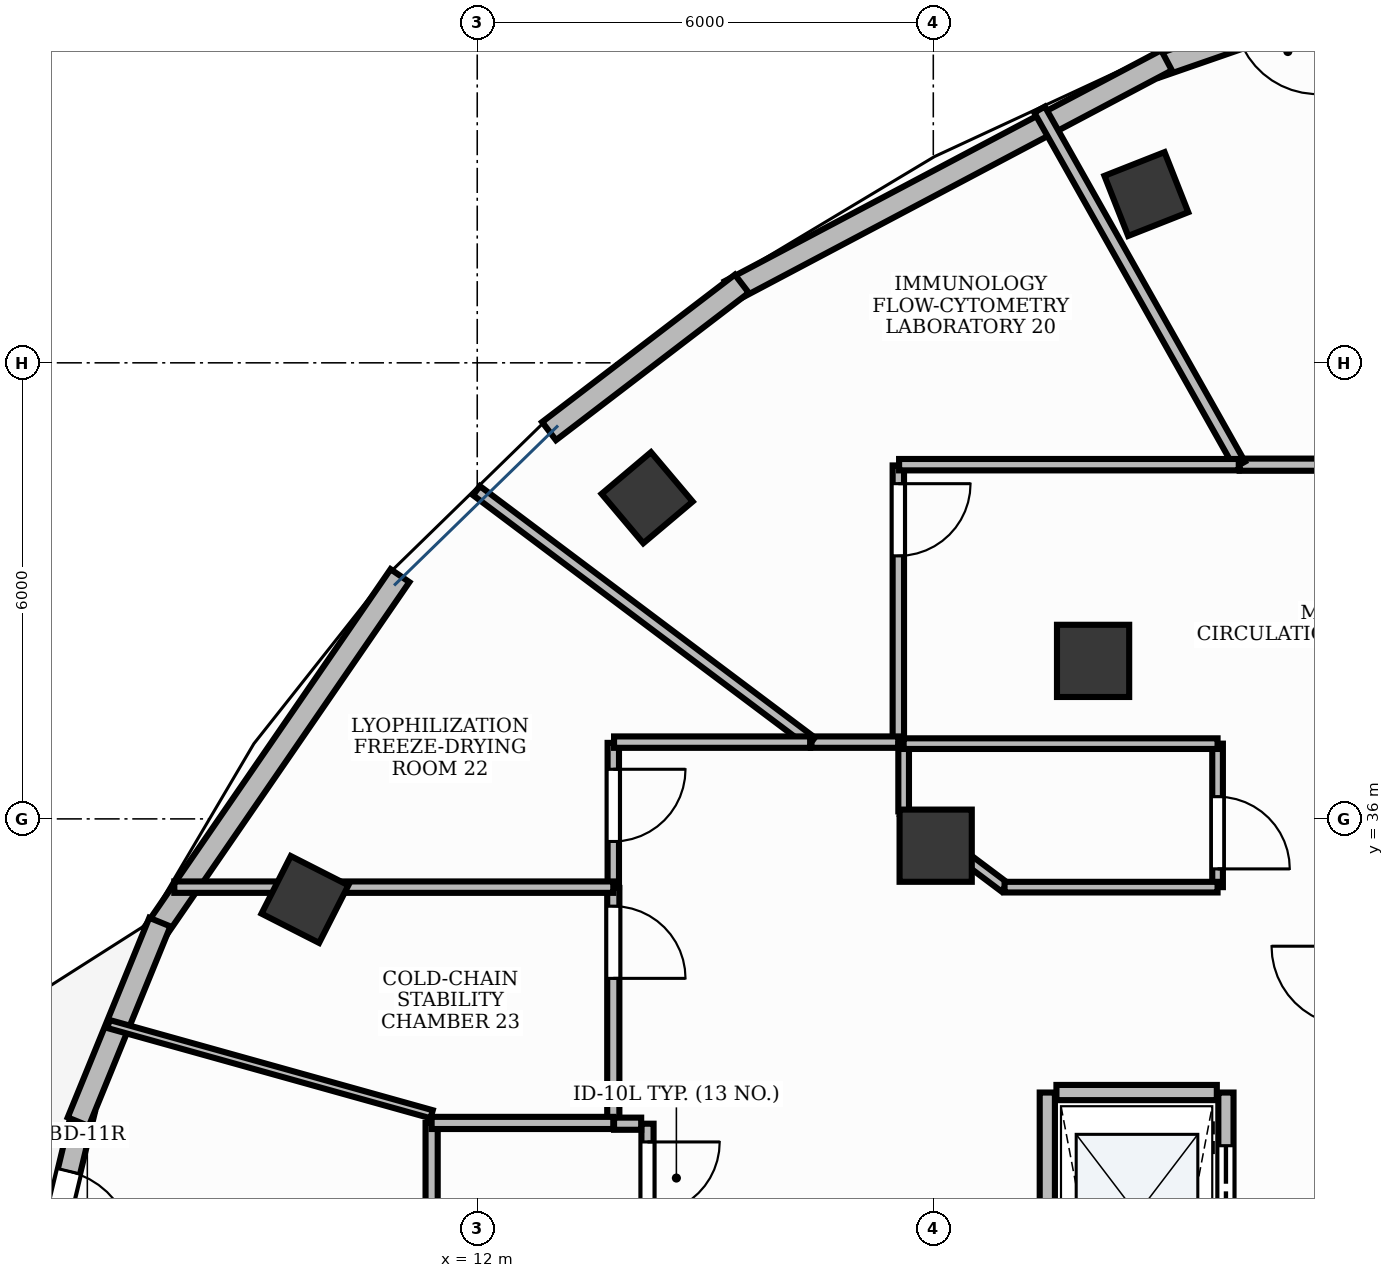
"""IFC4 building model, lengths in metres.
Left out: names, types, materials, properties, quantities, classifications, styles, units other than length and angle.
Written with IfcOpenShell. Run it as: python <this file> out.ifc"""

import sys

from ifc_helpers import new_model, si_unit, direction, frame, frame_2d, origin, origin_2d, place, context, subcontext, project, spatial, rectangle, extrude, element, fill, save


model = new_model("IFC4")
c1 = context("Model", 3, precision=1e-05, world=origin(), true_north=direction((0.0, 1.0)))
c2 = subcontext(c1, "Body", "Model", "MODEL_VIEW")
j1 = project(units=[si_unit("LENGTHUNIT", "METRE"), si_unit("PLANEANGLEUNIT", "RADIAN")], contexts=[c1])
p1 = place(None, origin())
s1 = spatial("IfcSite", under=j1, at=p1, CompositionType="ELEMENT")
p2 = place(p1, origin())
s2 = spatial("IfcBuilding", under=s1, at=p2, CompositionType="ELEMENT")
p3 = place(p2, frame((0.0, 0.0, 256.2)))
s3 = spatial("IfcBuildingStorey", under=s2, at=p3, CompositionType="ELEMENT", Elevation=256.2)
for number, where, z_axis, x_axis in (
    (1, (20.803, 44.22, -0.0), (0.0, 0.0, 1.0), (0.93, 0.367, 0.0)),
    (2, (14.235, 40.225, -0.0), (0.0, 0.0, 1.0), (0.764, 0.645, 0.0)),
):
    element("IfcColumn", number, at=place(p3, frame(where, z_axis=z_axis, x_axis=x_axis)), inside=s3, PredefinedType="COLUMN", context=c2, shape_type="SweptSolid", body=[
        extrude(rectangle(XDim=0.85, YDim=0.85, at=origin_2d()), origin(), (0.0, 0.0, 1.0), 3.901),
    ])
p4 = place(p3, frame((20.102, 38.079, -0.0), z_axis=(0.0, 0.0, 1.0), x_axis=(1.0, 0.0, 0.0)))
e3 = element("IfcColumn", 3, at=p4, inside=s3, PredefinedType="COLUMN", context=c2, shape_type="SweptSolid", body=[
    extrude(rectangle(XDim=0.95, YDim=0.95, at=origin_2d()), origin(), (0.0, 0.0, 1.0), 3.901),
])
p5 = place(p3, frame((9.733, 34.94, -0.0), z_axis=(0.0, 0.0, 1.0), x_axis=(0.453057191132, 0.891481453292, 0.0)))
e4 = element("IfcColumn", 4, at=p5, inside=s3, PredefinedType="COLUMN", context=c2, shape_type="SweptSolid", body=[
    extrude(rectangle(XDim=0.85, YDim=0.85, at=origin_2d()), origin(), (0.0, 0.0, 1.0), 3.901),
])
p6 = place(p3, frame((18.031, 35.647, -0.0), z_axis=(0.0, 0.0, 1.0), x_axis=(1.0, 0.0, 0.0)))
e5 = element("IfcColumn", 5, at=p6, inside=s3, PredefinedType="COLUMN", context=c2, shape_type="SweptSolid", body=[
    extrude(rectangle(XDim=0.95, YDim=0.95, at=origin_2d()), origin(), (0.0, 0.0, 1.0), 3.901),
])
p7 = place(p3, frame((24.152, 47.013, 0.0), z_axis=(0.0, 0.0, 1.0), x_axis=(-0.944837969822, -0.327538105849, 0.0)))
e6 = element("IfcWall", 6, at=p7, inside=s3, PredefinedType="STANDARD", context=c2, shape_type="SweptSolid", body=[
    extrude(rectangle(XDim=3.412, YDim=0.3, at=frame_2d((1.706, 0.0))), origin(), (0.0, 0.0, 1.0), 3.9),
])
p8 = place(p7, frame((1.156, 0.0, 0.0)))
e7 = element("IfcOpeningElement", 7, at=p8, cuts=e6, PredefinedType="OPENING", context=c2, shape_type="SweptSolid", body=[
    extrude(rectangle(XDim=1.1, YDim=2.15, at=frame_2d((0.55, 1.075))), frame((0.0, 0.165, 0.0), z_axis=(0.0, -1.0, 0.0), x_axis=(1.0, 0.0, 0.0)), (0.0, 0.0, 1.0), 0.33),
])
p9 = place(p3, frame((6.822, 32.164, 0.0), z_axis=(0.0, 0.0, 1.0), x_axis=(-0.233611743884, -0.972329961031, 0.0)))
e8 = element("IfcWall", 8, at=p9, inside=s3, PredefinedType="STANDARD", context=c2, shape_type="SweptSolid", body=[
    extrude(rectangle(XDim=2.745, YDim=0.3, at=frame_2d((1.373, 0.0))), origin(), (0.0, 0.0, 1.0), 3.9),
])
p10 = place(p9, frame((0.823, 0.0, 0.0)))
e9 = element("IfcOpeningElement", 9, at=p10, cuts=e8, PredefinedType="OPENING", context=c2, shape_type="SweptSolid", body=[
    extrude(rectangle(XDim=1.1, YDim=2.15, at=frame_2d((0.55, 1.075))), frame((0.0, 0.165, 0.0), z_axis=(0.0, -1.0, 0.0), x_axis=(1.0, 0.0, 0.0)), (0.0, 0.0, 1.0), 0.33),
])
p11 = place(p3, frame((21.069, 45.98, 0.0), z_axis=(0.0, 0.0, 1.0), x_axis=(-0.883907649271, -0.467661488216, 0.0)))
e10 = element("IfcWall", 10, at=p11, inside=s3, PredefinedType="STANDARD", context=c2, shape_type="SweptSolid", body=[
    extrude(rectangle(XDim=6.496, YDim=0.3, at=frame_2d((3.248, 0.0))), origin(), (0.0, 0.0, 1.0), 3.9),
])
p12 = place(p3, frame((15.481, 43.041, 0.0), z_axis=(0.0, 0.0, 1.0), x_axis=(-0.794422949099, -0.60736494626, 0.0)))
e11 = element("IfcWall", 11, at=p12, inside=s3, PredefinedType="STANDARD", context=c2, shape_type="SweptSolid", body=[
    extrude(rectangle(XDim=3.192, YDim=0.3, at=frame_2d((1.596, 0.0))), origin(), (0.0, 0.0, 1.0), 3.9),
])
p13 = place(p3, frame((10.984, 39.2, 0.0), z_axis=(0.0, 0.0, 1.0), x_axis=(-0.566669772846, -0.823945003349, 0.0)))
e12 = element("IfcWall", 12, at=p13, inside=s3, PredefinedType="STANDARD", context=c2, shape_type="SweptSolid", body=[
    extrude(rectangle(XDim=5.734, YDim=0.3, at=frame_2d((2.867, 0.0))), origin(), (0.0, 0.0, 1.0), 3.9),
])
p14 = place(p3, frame((7.824, 34.642, 0.0), z_axis=(0.0, 0.0, 1.0), x_axis=(-0.378264258805, -0.925697656101, 0.0)))
e13 = element("IfcWall", 13, at=p14, inside=s3, PredefinedType="STANDARD", context=c2, shape_type="SweptSolid", body=[
    extrude(rectangle(XDim=2.837, YDim=0.3, at=frame_2d((1.419, 0.0))), origin(), (0.0, 0.0, 1.0), 3.9),
])
p15 = place(p3, frame((19.5, 21.6, 0.0), z_axis=(0.0, 0.0, 1.0), x_axis=(0.0, 1.0, 0.0)))
e14 = element("IfcWall", 14, at=p15, inside=s3, PredefinedType="PARTITIONING", context=c2, shape_type="SweptSolid", body=[
    extrude(rectangle(XDim=10.8, YDim=0.2, at=frame_2d((5.4, 0.0))), origin(), (0.0, 0.0, 1.0), 2.22),
])
p16 = place(p3, frame((21.85, 21.6, 0.0), z_axis=(0.0, 0.0, 1.0), x_axis=(0.0, 1.0, 0.0)))
e15 = element("IfcWall", 15, at=p16, inside=s3, PredefinedType="PARTITIONING", context=c2, shape_type="SweptSolid", body=[
    extrude(rectangle(XDim=10.8, YDim=0.2, at=frame_2d((5.4, 0.0))), origin(), (0.0, 0.0, 1.0), 2.22),
])
p17 = place(p16, frame((0.9, 0.0, 0.0)))
e16 = element("IfcOpeningElement", 16, at=p17, cuts=e15, PredefinedType="OPENING", context=c2, shape_type="SweptSolid", body=[
    extrude(rectangle(XDim=1.1, YDim=2.2, at=frame_2d((0.55, 1.1))), frame((0.0, 0.115, 0.0), z_axis=(0.0, -1.0, 0.0), x_axis=(1.0, 0.0, 0.0)), (0.0, 0.0, 1.0), 0.23),
])
p18 = place(p16, frame((3.6, 0.0, 0.0)))
e17 = element("IfcOpeningElement", 17, at=p18, cuts=e15, PredefinedType="OPENING", context=c2, shape_type="SweptSolid", body=[
    extrude(rectangle(XDim=1.1, YDim=2.2, at=frame_2d((0.55, 1.1))), frame((0.0, 0.115, 0.0), z_axis=(0.0, -1.0, 0.0), x_axis=(1.0, 0.0, 0.0)), (0.0, 0.0, 1.0), 0.23),
])
p19 = place(p16, frame((6.3, 0.0, 0.0)))
e18 = element("IfcOpeningElement", 18, at=p19, cuts=e15, PredefinedType="OPENING", context=c2, shape_type="SweptSolid", body=[
    extrude(rectangle(XDim=1.1, YDim=2.2, at=frame_2d((0.55, 1.1))), frame((0.0, 0.115, 0.0), z_axis=(0.0, -1.0, 0.0), x_axis=(1.0, 0.0, 0.0)), (0.0, 0.0, 1.0), 0.23),
])
p20 = place(p16, frame((9.0, 0.0, 0.0)))
e19 = element("IfcOpeningElement", 19, at=p20, cuts=e15, PredefinedType="OPENING", context=c2, shape_type="SweptSolid", body=[
    extrude(rectangle(XDim=1.1, YDim=2.2, at=frame_2d((0.55, 1.1))), frame((0.0, 0.115, 0.0), z_axis=(0.0, -1.0, 0.0), x_axis=(1.0, 0.0, 0.0)), (0.0, 0.0, 1.0), 0.23),
])
p21 = place(p3, frame((19.62, 32.4, 0.0), z_axis=(0.0, 0.0, 1.0), x_axis=(1.0, 0.0, 0.0)))
e20 = element("IfcWall", 20, at=p21, inside=s3, PredefinedType="PARTITIONING", context=c2, shape_type="SweptSolid", body=[
    extrude(rectangle(XDim=2.11, YDim=0.2, at=frame_2d((1.055, 0.0))), origin(), (0.0, 0.0, 1.0), 2.22),
])
p22 = place(p3, frame((14.24, 31.99, 0.0), z_axis=(0.0, 0.0, 1.0), x_axis=(0.0, -1.0, 0.0)))
e21 = element("IfcWall", 21, at=p22, inside=s3, PredefinedType="PARTITIONING", context=c2, shape_type="SweptSolid", body=[
    extrude(rectangle(XDim=3.58, YDim=0.16, at=frame_2d((1.79, 0.0))), origin(), (0.0, 0.0, 1.0), 2.22),
])
p23 = place(p22, frame((0.24, 0.0, 0.0)))
e22 = element("IfcOpeningElement", 22, at=p23, cuts=e21, PredefinedType="OPENING", context=c2, shape_type="SweptSolid", body=[
    extrude(rectangle(XDim=0.95, YDim=2.15, at=frame_2d((0.475, 1.075))), frame((0.0, 0.095, 0.0), z_axis=(0.0, -1.0, 0.0), x_axis=(1.0, 0.0, 0.0)), (0.0, 0.0, 1.0), 0.19),
])
p24 = place(p3, frame((28.354, 40.66, 0.0), z_axis=(0.0, 0.0, 1.0), x_axis=(-1.0, 0.0, 0.0)))
e23 = element("IfcWall", 23, at=p24, inside=s3, PredefinedType="PARTITIONING", context=c2, shape_type="SweptSolid", body=[
    extrude(rectangle(XDim=6.323, YDim=0.16, at=frame_2d((3.162, 0.0))), origin(), (0.0, 0.0, 1.0), 2.22),
])
p25 = place(p24, frame((0.24, 0.0, 0.0)))
e24 = element("IfcOpeningElement", 24, at=p25, cuts=e23, PredefinedType="OPENING", context=c2, shape_type="SweptSolid", body=[
    extrude(rectangle(XDim=0.95, YDim=2.15, at=frame_2d((0.475, 1.075))), frame((0.0, 0.095, 0.0), z_axis=(0.0, -1.0, 0.0), x_axis=(1.0, 0.0, 0.0)), (0.0, 0.0, 1.0), 0.19),
])
p26 = place(p3, frame((17.54, 40.65, 0.0), z_axis=(0.0, 0.0, 1.0), x_axis=(0.0, -1.0, 0.0)))
e25 = element("IfcWall", 25, at=p26, inside=s3, PredefinedType="PARTITIONING", context=c2, shape_type="SweptSolid", body=[
    extrude(rectangle(XDim=3.64, YDim=0.15, at=frame_2d((1.82, 0.0))), origin(), (0.0, 0.0, 1.0), 2.22),
])
p27 = place(p26, frame((0.24, 0.0, 0.0)))
e26 = element("IfcOpeningElement", 26, at=p27, cuts=e25, PredefinedType="OPENING", context=c2, shape_type="SweptSolid", body=[
    extrude(rectangle(XDim=0.95, YDim=2.15, at=frame_2d((0.475, 1.075))), frame((0.0, 0.09, 0.0), z_axis=(0.0, -1.0, 0.0), x_axis=(1.0, 0.0, 0.0)), (0.0, 0.0, 1.0), 0.18),
])
p28 = place(p3, frame((21.74, 36.99, 0.0), z_axis=(0.0, 0.0, 1.0), x_axis=(0.0, -1.0, 0.0)))
e27 = element("IfcWall", 27, at=p28, inside=s3, PredefinedType="PARTITIONING", context=c2, shape_type="SweptSolid", body=[
    extrude(rectangle(XDim=1.888, YDim=0.14, at=frame_2d((0.944, 0.0))), origin(), (0.0, 0.0, 1.0), 2.22),
])
p29 = place(p28, frame((0.698, 0.0, 0.0)))
e28 = element("IfcOpeningElement", 28, at=p29, cuts=e27, PredefinedType="OPENING", context=c2, shape_type="SweptSolid", body=[
    extrude(rectangle(XDim=0.95, YDim=2.15, at=frame_2d((0.475, 1.075))), frame((0.0, 0.085, 0.0), z_axis=(0.0, -1.0, 0.0), x_axis=(1.0, 0.0, 0.0)), (0.0, 0.0, 1.0), 0.17),
])
p30 = place(p3, frame((13.79, 37.0, 0.0), z_axis=(0.0, 0.0, 1.0), x_axis=(0.0, -1.0, 0.0)))
e29 = element("IfcWall", 29, at=p30, inside=s3, PredefinedType="PARTITIONING", context=c2, shape_type="SweptSolid", body=[
    extrude(rectangle(XDim=1.898, YDim=0.15, at=frame_2d((0.949, 0.0))), origin(), (0.0, 0.0, 1.0), 2.22),
])
p31 = place(p30, frame((0.347, 0.0, 0.0)))
e30 = element("IfcOpeningElement", 30, at=p31, cuts=e29, PredefinedType="OPENING", context=c2, shape_type="SweptSolid", body=[
    extrude(rectangle(XDim=0.95, YDim=2.15, at=frame_2d((0.475, 1.075))), frame((0.0, 0.09, 0.0), z_axis=(0.0, -1.0, 0.0), x_axis=(1.0, 0.0, 0.0)), (0.0, 0.0, 1.0), 0.18),
])
p32 = place(p3, frame((13.79, 35.092, 0.0), z_axis=(0.0, 0.0, 1.0), x_axis=(0.0, -1.0, 0.0)))
e31 = element("IfcWall", 31, at=p32, inside=s3, PredefinedType="PARTITIONING", context=c2, shape_type="SweptSolid", body=[
    extrude(rectangle(XDim=3.082, YDim=0.16, at=frame_2d((1.541, 0.0))), origin(), (0.0, 0.0, 1.0), 2.22),
])
p33 = place(p32, frame((0.24, 0.0, 0.0)))
e32 = element("IfcOpeningElement", 32, at=p33, cuts=e31, PredefinedType="OPENING", context=c2, shape_type="SweptSolid", body=[
    extrude(rectangle(XDim=0.95, YDim=2.15, at=frame_2d((0.475, 1.075))), frame((0.0, 0.095, 0.0), z_axis=(0.0, -1.0, 0.0), x_axis=(1.0, 0.0, 0.0)), (0.0, 0.0, 1.0), 0.19),
])
p34 = place(p3, frame((13.8, 31.99, 0.0), z_axis=(0.0, 0.0, 1.0), x_axis=(1.0, 0.0, 0.0)))
e33 = element("IfcWall", 33, at=p34, inside=s3, PredefinedType="PARTITIONING", context=c2, shape_type="SweptSolid", body=[
    extrude(rectangle(XDim=0.357, YDim=0.16, at=frame_2d((0.178, 0.0))), origin(), (0.0, 0.0, 1.0), 2.22),
])
p35 = place(p3, frame((11.4, 28.4, 0.0), z_axis=(0.0, 0.0, 1.0), x_axis=(0.0, 1.0, 0.0)))
e34 = element("IfcWall", 34, at=p35, inside=s3, PredefinedType="PARTITIONING", context=c2, shape_type="SweptSolid", body=[
    extrude(rectangle(XDim=3.6, YDim=0.16, at=frame_2d((1.8, 0.0))), origin(), (0.0, 0.0, 1.0), 2.22),
])
p36 = place(p3, frame((11.4, 32.0, 0.0), z_axis=(0.0, 0.0, 1.0), x_axis=(1.0, 0.0, 0.0)))
e35 = element("IfcWall", 35, at=p36, inside=s3, PredefinedType="PARTITIONING", context=c2, shape_type="SweptSolid", body=[
    extrude(rectangle(XDim=2.39, YDim=0.16, at=frame_2d((1.195, 0.0))), origin(), (0.0, 0.0, 1.0), 2.22),
])
p37 = place(p3, frame((7.149, 33.301, 0.0), z_axis=(0.0, 0.0, 1.0), x_axis=(0.963173983888, -0.268878925842, 0.0)))
e36 = element("IfcWall", 36, at=p37, inside=s3, PredefinedType="MOVABLE", context=c2, shape_type="SweptSolid", body=[
    extrude(rectangle(XDim=4.414, YDim=0.11, at=frame_2d((2.207, 0.0))), origin(), (0.0, 0.0, 1.0), 2.22),
])
p38 = place(p3, frame((22.031, 40.66, 0.0), z_axis=(0.0, 0.0, 1.0), x_axis=(-0.490903118402, 0.871214169044, 0.0)))
e37 = element("IfcWall", 37, at=p38, inside=s3, PredefinedType="PARTITIONING", context=c2, shape_type="SweptSolid", body=[
    extrude(rectangle(XDim=5.362, YDim=0.16, at=frame_2d((2.681, 0.0))), origin(), (0.0, 0.0, 1.0), 2.22),
])
p39 = place(p3, frame((22.019, 40.66, 0.0), z_axis=(0.0, 0.0, 1.0), x_axis=(-1.0, 0.0, 0.0)))
e38 = element("IfcWall", 38, at=p39, inside=s3, PredefinedType="PARTITIONING", context=c2, shape_type="SweptSolid", body=[
    extrude(rectangle(XDim=4.469, YDim=0.15, at=frame_2d((2.234, 0.0))), origin(), (0.0, 0.0, 1.0), 2.22),
])
p40 = place(p3, frame((17.54, 37.01, 0.0), z_axis=(0.0, 0.0, 1.0), x_axis=(-1.0, 0.0, 0.0)))
e39 = element("IfcWall", 39, at=p40, inside=s3, PredefinedType="PARTITIONING", context=c2, shape_type="SweptSolid", body=[
    extrude(rectangle(XDim=1.144, YDim=0.15, at=frame_2d((0.572, 0.0))), origin(), (0.0, 0.0, 1.0), 2.22),
])
p41 = place(p3, frame((16.396, 37.01, 0.0), z_axis=(0.0, 0.0, 1.0), x_axis=(-0.799686236125, 0.600418124104, 0.0)))
e40 = element("IfcWall", 40, at=p41, inside=s3, PredefinedType="PARTITIONING", context=c2, shape_type="SweptSolid", body=[
    extrude(rectangle(XDim=5.511, YDim=0.15, at=frame_2d((2.755, 0.0))), origin(), (0.0, 0.0, 1.0), 2.22),
])
p42 = place(p3, frame((18.938, 35.102, 0.0), z_axis=(0.0, 0.0, 1.0), x_axis=(-0.799629226512, 0.600494046689, 0.0)))
e41 = element("IfcWall", 41, at=p42, inside=s3, PredefinedType="PARTITIONING", context=c2, shape_type="SweptSolid", body=[
    extrude(rectangle(XDim=1.66, YDim=0.14, at=frame_2d((0.83, 0.0))), origin(), (0.0, 0.0, 1.0), 2.22),
])
p43 = place(p3, frame((17.61, 36.099, 0.0), z_axis=(0.0, 0.0, 1.0), x_axis=(0.0, 1.0, 0.0)))
e42 = element("IfcWall", 42, at=p43, inside=s3, PredefinedType="PARTITIONING", context=c2, shape_type="SweptSolid", body=[
    extrude(rectangle(XDim=0.891, YDim=0.14, at=frame_2d((0.446, 0.0))), origin(), (0.0, 0.0, 1.0), 2.22),
])
p44 = place(p3, frame((17.61, 36.99, 0.0), z_axis=(0.0, 0.0, 1.0), x_axis=(1.0, 0.0, 0.0)))
e43 = element("IfcWall", 43, at=p44, inside=s3, PredefinedType="PARTITIONING", context=c2, shape_type="SweptSolid", body=[
    extrude(rectangle(XDim=4.13, YDim=0.14, at=frame_2d((2.065, 0.0))), origin(), (0.0, 0.0, 1.0), 2.22),
])
p45 = place(p3, frame((21.74, 35.102, 0.0), z_axis=(0.0, 0.0, 1.0), x_axis=(-1.0, 0.0, 0.0)))
e44 = element("IfcWall", 44, at=p45, inside=s3, PredefinedType="PARTITIONING", context=c2, shape_type="SweptSolid", body=[
    extrude(rectangle(XDim=2.802, YDim=0.14, at=frame_2d((1.401, 0.0))), origin(), (0.0, 0.0, 1.0), 2.22),
])
p46 = place(p3, frame((16.38, 37.01, 0.0), z_axis=(0.0, 0.0, 1.0), x_axis=(-1.0, 0.0, 0.0)))
e45 = element("IfcWall", 45, at=p46, inside=s3, PredefinedType="PARTITIONING", context=c2, shape_type="SweptSolid", body=[
    extrude(rectangle(XDim=2.58, YDim=0.15, at=frame_2d((1.29, 0.0))), origin(), (0.0, 0.0, 1.0), 2.22),
])
p47 = place(p3, frame((13.79, 35.102, 0.0), z_axis=(0.0, 0.0, 1.0), x_axis=(-1.0, 0.0, 0.0)))
e46 = element("IfcWall", 46, at=p47, inside=s3, PredefinedType="PARTITIONING", context=c2, shape_type="SweptSolid", body=[
    extrude(rectangle(XDim=5.775, YDim=0.15, at=frame_2d((2.888, 0.0))), origin(), (0.0, 0.0, 1.0), 2.22),
])
p48 = place(p10, origin())
e47 = element("IfcDoor", 47, at=p48, inside=s3, OperationType="SINGLE_SWING_RIGHT", PredefinedType="DOOR", context=c2, shape_type="SweptSolid", body=[
    extrude(rectangle(XDim=1.1, YDim=2.15, at=frame_2d((0.55, 1.075))), frame((0.0, 0.025, 0.0), z_axis=(0.0, -1.0, 0.0), x_axis=(1.0, 0.0, 0.0)), (0.0, 0.0, 1.0), 0.05),
])
fill(e9, e47)
p49 = place(p20, origin())
e48 = element("IfcDoor", 48, at=p49, inside=s3, OperationType="DOUBLE_DOOR_SLIDING", PredefinedType="DOOR", context=c2, shape_type="SweptSolid", body=[
    extrude(rectangle(XDim=1.1, YDim=2.2, at=frame_2d((0.55, 1.1))), frame((0.0, 0.025, 0.0), z_axis=(0.0, -1.0, 0.0), x_axis=(1.0, 0.0, 0.0)), (0.0, 0.0, 1.0), 0.05),
])
fill(e19, e48)
p50 = place(p23, origin())
e49 = element("IfcDoor", 49, at=p50, inside=s3, OperationType="SINGLE_SWING_LEFT", PredefinedType="DOOR", context=c2, shape_type="SweptSolid", body=[
    extrude(rectangle(XDim=0.95, YDim=2.15, at=frame_2d((0.475, 1.075))), frame((0.0, 0.025, 0.0), z_axis=(0.0, -1.0, 0.0), x_axis=(1.0, 0.0, 0.0)), (0.0, 0.0, 1.0), 0.05),
])
fill(e22, e49)
p51 = place(p27, origin())
e50 = element("IfcDoor", 50, at=p51, inside=s3, OperationType="SINGLE_SWING_LEFT", PredefinedType="DOOR", context=c2, shape_type="SweptSolid", body=[
    extrude(rectangle(XDim=0.95, YDim=2.15, at=frame_2d((0.475, 1.075))), frame((0.0, 0.025, 0.0), z_axis=(0.0, -1.0, 0.0), x_axis=(1.0, 0.0, 0.0)), (0.0, 0.0, 1.0), 0.05),
])
fill(e26, e50)
p52 = place(p29, origin())
e51 = element("IfcDoor", 51, at=p52, inside=s3, OperationType="SINGLE_SWING_RIGHT", PredefinedType="DOOR", context=c2, shape_type="SweptSolid", body=[
    extrude(rectangle(XDim=0.95, YDim=2.15, at=frame_2d((0.475, 1.075))), frame((0.0, 0.025, 0.0), z_axis=(0.0, -1.0, 0.0), x_axis=(1.0, 0.0, 0.0)), (0.0, 0.0, 1.0), 0.05),
])
fill(e28, e51)
p53 = place(p31, origin())
e52 = element("IfcDoor", 52, at=p53, inside=s3, OperationType="SINGLE_SWING_LEFT", PredefinedType="DOOR", context=c2, shape_type="SweptSolid", body=[
    extrude(rectangle(XDim=0.95, YDim=2.15, at=frame_2d((0.475, 1.075))), frame((0.0, 0.025, 0.0), z_axis=(0.0, -1.0, 0.0), x_axis=(1.0, 0.0, 0.0)), (0.0, 0.0, 1.0), 0.05),
])
fill(e30, e52)
p54 = place(p33, origin())
e53 = element("IfcDoor", 53, at=p54, inside=s3, OperationType="SINGLE_SWING_RIGHT", PredefinedType="DOOR", context=c2, shape_type="SweptSolid", body=[
    extrude(rectangle(XDim=0.95, YDim=2.15, at=frame_2d((0.475, 1.075))), frame((0.0, 0.025, 0.0), z_axis=(0.0, -1.0, 0.0), x_axis=(1.0, 0.0, 0.0)), (0.0, 0.0, 1.0), 0.05),
])
fill(e32, e53)
save(model, sys.argv[1])
